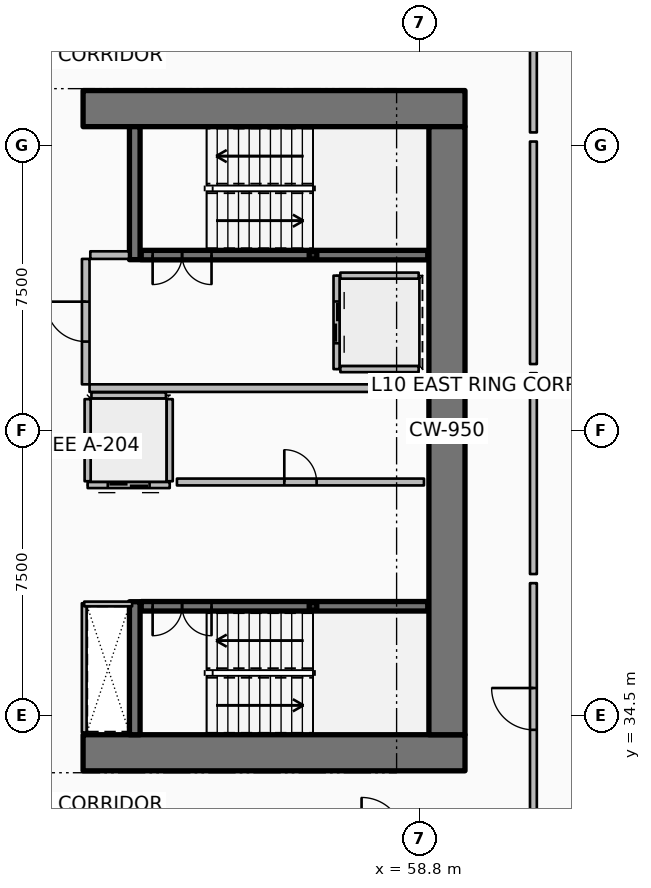
"""IFC4 building model, lengths in metres.
Left out: names, types, materials, properties, quantities, classifications, styles, units other than length and angle.
Written with IfcOpenShell. Run it as: python <this file> out.ifc"""

import sys

from ifc_helpers import new_model, si_unit, direction, frame, frame_2d, origin, origin_2d, place, context, subcontext, project, spatial, rectangle, hollow_rectangle, extrude, element, fill, save


model = new_model("IFC4")
c1 = context("Model", 3, precision=1e-05, world=origin(), true_north=direction((0.0, 1.0)))
c2 = subcontext(c1, "Body", "Model", "MODEL_VIEW")
j1 = project(units=[si_unit("LENGTHUNIT", "METRE"), si_unit("PLANEANGLEUNIT", "RADIAN")], contexts=[c1])
p1 = place(None, origin())
s1 = spatial("IfcSite", under=j1, at=p1, CompositionType="ELEMENT")
p2 = place(p1, origin())
s2 = spatial("IfcBuilding", under=s1, at=p2, CompositionType="ELEMENT")
p3 = place(p2, frame((0.0, 0.0, 45.15)))
s3 = spatial("IfcBuildingStorey", under=s2, at=p3, CompositionType="ELEMENT", Elevation=45.15)
for number, where, z_axis, x_axis in (
    (1, (49.95, 33.525, 0.0), (0.0, 0.0, 1.0), (1.0, 0.0, 0.0)),
    (2, (49.95, 50.475, 0.0), (0.0, 0.0, 1.0), (1.0, 0.0, 0.0)),
):
    element("IfcWall", number, at=place(p3, frame(where, z_axis=z_axis, x_axis=x_axis)), inside=s3, PredefinedType="SHEAR", context=c2, shape_type="SweptSolid", body=[
        extrude(rectangle(XDim=10.05, YDim=0.95, at=frame_2d((5.025, 0.0))), origin(), (0.0, 0.0, 1.0), 3.75),
    ])
p4 = place(p3, frame((59.525, 34.0, 0.0), z_axis=(0.0, 0.0, 1.0), x_axis=(0.0, 1.0, 0.0)))
e3 = element("IfcWall", 3, at=p4, inside=s3, PredefinedType="SHEAR", context=c2, shape_type="SweptSolid", body=[
    extrude(rectangle(XDim=16.0, YDim=0.95, at=frame_2d((8.0, 0.0))), origin(), (0.0, 0.0, 1.0), 3.75),
])
for number, where, z_axis, x_axis in (
    (4, (51.31, 46.5, 0.0), (0.0, 0.0, 1.0), (0.0, 1.0, 0.0)),
    (5, (51.31, 34.0, 0.0), (0.0, 0.0, 1.0), (0.0, 1.0, 0.0)),
):
    element("IfcWall", number, at=place(p3, frame(where, z_axis=z_axis, x_axis=x_axis)), inside=s3, PredefinedType="SHEAR", context=c2, shape_type="SweptSolid", body=[
        extrude(rectangle(XDim=3.5, YDim=0.28, at=frame_2d((1.75, 0.0))), origin(), (0.0, 0.0, 1.0), 3.75),
    ])
for number, where, z_axis, x_axis in (
    (6, (56.0, 46.62, 0.0), (0.0, 0.0, 1.0), (1.0, 0.0, 0.0)),
    (7, (56.0, 37.38, 0.0), (0.0, 0.0, 1.0), (1.0, 0.0, 0.0)),
):
    element("IfcColumn", number, at=place(p3, frame(where, z_axis=z_axis, x_axis=x_axis)), inside=s3, PredefinedType="COLUMN", context=c2, shape_type="SweptSolid", body=[
        extrude(hollow_rectangle(XDim=0.2, YDim=0.2, WallThickness=0.01, InnerFilletRadius=0.01, OuterFilletRadius=0.02, at=origin_2d()), origin(), (0.0, 0.0, 1.0), 1.67),
    ])
p5 = place(p3, frame((51.48, 46.62, 0.0), z_axis=(0.0, 0.0, 1.0), x_axis=(1.0, 0.0, 0.0)))
e8 = element("IfcWall", 8, at=p5, inside=s3, PredefinedType="SOLIDWALL", context=c2, shape_type="SweptSolid", body=[
    extrude(rectangle(XDim=7.54, YDim=0.25, at=frame_2d((3.77, 0.0))), origin(), (0.0, 0.0, 1.0), 3.5),
])
p6 = place(p5, frame((0.3, 0.0, 0.0)))
e9 = element("IfcOpeningElement", 9, at=p6, cuts=e8, PredefinedType="OPENING", context=c2, shape_type="SweptSolid", body=[
    extrude(rectangle(XDim=1.55, YDim=2.15, at=frame_2d((0.775, 1.075))), frame((0.0, 0.135, 0.0), z_axis=(0.0, -1.0, 0.0), x_axis=(1.0, 0.0, 0.0)), (0.0, 0.0, 1.0), 0.27),
])
p7 = place(p3, frame((51.48, 37.38, 0.0), z_axis=(0.0, 0.0, 1.0), x_axis=(1.0, 0.0, 0.0)))
e10 = element("IfcWall", 10, at=p7, inside=s3, PredefinedType="SOLIDWALL", context=c2, shape_type="SweptSolid", body=[
    extrude(rectangle(XDim=7.54, YDim=0.25, at=frame_2d((3.77, 0.0))), origin(), (0.0, 0.0, 1.0), 3.5),
])
p8 = place(p7, frame((0.3, 0.0, 0.0)))
e11 = element("IfcOpeningElement", 11, at=p8, cuts=e10, PredefinedType="OPENING", context=c2, shape_type="SweptSolid", body=[
    extrude(rectangle(XDim=1.55, YDim=2.15, at=frame_2d((0.775, 1.075))), frame((0.0, 0.135, 0.0), z_axis=(0.0, -1.0, 0.0), x_axis=(1.0, 0.0, 0.0)), (0.0, 0.0, 1.0), 0.27),
])
p9 = place(p3, frame((56.62, 46.08, 0.0), z_axis=(0.0, 0.0, 1.0), x_axis=(0.0, -1.0, 0.0)))
e12 = element("IfcWall", 12, at=p9, inside=s3, PredefinedType="PARTITIONING", context=c2, shape_type="SweptSolid", body=[
    extrude(rectangle(XDim=2.46, YDim=0.16, at=frame_2d((1.23, 0.0))), origin(), (0.0, 0.0, 1.0), 3.5),
])
p10 = place(p9, frame((0.68, 0.0, 0.0)))
e13 = element("IfcOpeningElement", 13, at=p10, cuts=e12, PredefinedType="OPENING", context=c2, shape_type="SweptSolid", body=[
    extrude(rectangle(XDim=1.1, YDim=2.1, at=frame_2d((0.55, 1.05))), frame((0.0, 0.09, 0.0), z_axis=(0.0, -1.0, 0.0), x_axis=(1.0, 0.0, 0.0)), (0.0, 0.0, 1.0), 0.18),
])
for number, where, z_axis, x_axis in (
    (14, (56.72, 46.08, 0.0), (0.0, 0.0, 1.0), (1.0, 0.0, 0.0)),
    (15, (56.72, 43.62, 0.0), (0.0, 0.0, 1.0), (1.0, 0.0, 0.0)),
):
    element("IfcWall", number, at=place(p3, frame(where, z_axis=z_axis, x_axis=x_axis)), inside=s3, PredefinedType="PARTITIONING", context=c2, shape_type="SweptSolid", body=[
        extrude(rectangle(XDim=2.06, YDim=0.16, at=frame_2d((1.03, 0.0))), origin(), (0.0, 0.0, 1.0), 3.5),
    ])
p11 = place(p3, frame((52.23, 40.57, 0.0), z_axis=(0.0, 0.0, 1.0), x_axis=(-1.0, 0.0, 0.0)))
e16 = element("IfcWall", 16, at=p11, inside=s3, PredefinedType="PARTITIONING", context=c2, shape_type="SweptSolid", body=[
    extrude(rectangle(XDim=2.16, YDim=0.16, at=frame_2d((1.08, 0.0))), origin(), (0.0, 0.0, 1.0), 3.5),
])
p12 = place(p11, frame((0.53, 0.0, 0.0)))
e17 = element("IfcOpeningElement", 17, at=p12, cuts=e16, PredefinedType="OPENING", context=c2, shape_type="SweptSolid", body=[
    extrude(rectangle(XDim=1.1, YDim=2.1, at=frame_2d((0.55, 1.05))), frame((0.0, 0.09, 0.0), z_axis=(0.0, -1.0, 0.0), x_axis=(1.0, 0.0, 0.0)), (0.0, 0.0, 1.0), 0.18),
])
for number, where, z_axis, x_axis in (
    (18, (52.23, 40.67, 0.0), (0.0, 0.0, 1.0), (0.0, 1.0, 0.0)),
    (19, (50.07, 40.67, 0.0), (0.0, 0.0, 1.0), (0.0, 1.0, 0.0)),
):
    element("IfcWall", number, at=place(p3, frame(where, z_axis=z_axis, x_axis=x_axis)), inside=s3, PredefinedType="PARTITIONING", context=c2, shape_type="SweptSolid", body=[
        extrude(rectangle(XDim=2.16, YDim=0.16, at=frame_2d((1.08, 0.0))), origin(), (0.0, 0.0, 1.0), 3.5),
    ])
p13 = place(p3, frame((50.17, 42.93, 0.0), z_axis=(0.0, 0.0, 1.0), x_axis=(1.0, 0.0, 0.0)))
e20 = element("IfcWall", 20, at=p13, inside=s3, PredefinedType="PARTITIONING", context=c2, shape_type="SweptSolid", body=[
    extrude(rectangle(XDim=1.96, YDim=0.16, at=frame_2d((0.98, 0.0))), origin(), (0.0, 0.0, 1.0), 3.5),
])
p14 = place(p3, frame((52.42, 40.65, 0.0), z_axis=(0.0, 0.0, 1.0), x_axis=(1.0, 0.0, 0.0)))
e21 = element("IfcWall", 21, at=p14, inside=s3, PredefinedType="PARTITIONING", context=c2, shape_type="SweptSolid", body=[
    extrude(rectangle(XDim=6.5, YDim=0.18, at=frame_2d((3.25, 0.0))), origin(), (0.0, 0.0, 1.0), 3.5),
])
p15 = place(p14, frame((2.825, 0.0, 0.0)))
e22 = element("IfcOpeningElement", 22, at=p15, cuts=e21, PredefinedType="OPENING", context=c2, shape_type="SweptSolid", body=[
    extrude(rectangle(XDim=0.85, YDim=2.06, at=frame_2d((0.425, 1.03))), frame((0.0, 0.1, 0.0), z_axis=(0.0, -1.0, 0.0), x_axis=(1.0, 0.0, 0.0)), (0.0, 0.0, 1.0), 0.2),
])
p16 = place(p3, frame((50.12, 43.12, 0.0), z_axis=(0.0, 0.0, 1.0), x_axis=(1.0, 0.0, 0.0)))
e23 = element("IfcWall", 23, at=p16, inside=s3, PredefinedType="PARTITIONING", context=c2, shape_type="SweptSolid", body=[
    extrude(rectangle(XDim=8.88, YDim=0.2, at=frame_2d((4.44, 0.0))), origin(), (0.0, 0.0, 1.0), 3.5),
])
p17 = place(p3, frame((50.14, 46.62, 0.0), z_axis=(0.0, 0.0, 1.0), x_axis=(1.0, 0.0, 0.0)))
e24 = element("IfcWall", 24, at=p17, inside=s3, PredefinedType="PARTITIONING", context=c2, shape_type="SweptSolid", body=[
    extrude(rectangle(XDim=1.02, YDim=0.2, at=frame_2d((0.51, 0.0))), origin(), (0.0, 0.0, 1.0), 3.5),
])
p18 = place(p3, frame((50.02, 43.22, 0.0), z_axis=(0.0, 0.0, 1.0), x_axis=(0.0, 1.0, 0.0)))
e25 = element("IfcWall", 25, at=p18, inside=s3, PredefinedType="PARTITIONING", context=c2, shape_type="SweptSolid", body=[
    extrude(rectangle(XDim=3.3, YDim=0.2, at=frame_2d((1.65, 0.0))), origin(), (0.0, 0.0, 1.0), 3.5),
])
p19 = place(p18, frame((1.125, 0.0, 0.0)))
e26 = element("IfcOpeningElement", 26, at=p19, cuts=e25, PredefinedType="OPENING", context=c2, shape_type="SweptSolid", body=[
    extrude(rectangle(XDim=1.05, YDim=2.1, at=frame_2d((0.525, 1.05))), frame((0.0, 0.11, 0.0), z_axis=(0.0, -1.0, 0.0), x_axis=(1.0, 0.0, 0.0)), (0.0, 0.0, 1.0), 0.22),
])
p20 = place(p3, frame((49.98, 34.06, 0.0), z_axis=(0.0, 0.0, 1.0), x_axis=(0.0, 1.0, 0.0)))
e27 = element("IfcWall", 27, at=p20, inside=s3, PredefinedType="PARTITIONING", context=c2, shape_type="SweptSolid", body=[
    extrude(rectangle(XDim=3.4, YDim=0.125, at=frame_2d((1.7, 0.0))), origin(), (0.0, 0.0, 1.0), 2.94),
])
p21 = place(p3, frame((49.98, 37.44, 0.0), z_axis=(0.0, 0.0, 1.0), x_axis=(1.0, 0.0, 0.0)))
e28 = element("IfcWall", 28, at=p21, inside=s3, PredefinedType="PARTITIONING", context=c2, shape_type="SweptSolid", body=[
    extrude(rectangle(XDim=1.26, YDim=0.125, at=frame_2d((0.63, 0.0))), origin(), (0.0, 0.0, 1.0), 2.94),
])
p22 = place(p3, frame((61.8, 31.37, 0.0), z_axis=(0.0, 0.0, 1.0), x_axis=(0.0, 1.0, 0.0)))
e29 = element("IfcWall", 29, at=p22, inside=s3, PredefinedType="PARTITIONING", context=c2, shape_type="SweptSolid", body=[
    extrude(rectangle(XDim=6.618, YDim=0.18, at=frame_2d((3.309, 0.0))), origin(), (0.0, 0.0, 1.0), 2.867),
])
p23 = place(p22, frame((2.759, 0.0, 0.0)))
e30 = element("IfcOpeningElement", 30, at=p23, cuts=e29, PredefinedType="OPENING", context=c2, shape_type="SweptSolid", body=[
    extrude(rectangle(XDim=1.1, YDim=2.1, at=frame_2d((0.55, 1.05))), frame((0.0, 0.1, 0.0), z_axis=(0.0, -1.0, 0.0), x_axis=(1.0, 0.0, 0.0)), (0.0, 0.0, 1.0), 0.2),
])
p24 = place(p3, frame((61.8, 38.228, 0.0), z_axis=(0.0, 0.0, 1.0), x_axis=(0.0, 1.0, 0.0)))
e31 = element("IfcWall", 31, at=p24, inside=s3, PredefinedType="PARTITIONING", context=c2, shape_type="SweptSolid", body=[
    extrude(rectangle(XDim=5.285, YDim=0.18, at=frame_2d((2.643, 0.0))), origin(), (0.0, 0.0, 1.0), 2.867),
])
p25 = place(p3, frame((61.8, 43.753, 0.0), z_axis=(0.0, 0.0, 1.0), x_axis=(0.0, 1.0, 0.0)))
e32 = element("IfcWall", 32, at=p25, inside=s3, PredefinedType="PARTITIONING", context=c2, shape_type="SweptSolid", body=[
    extrude(rectangle(XDim=5.855, YDim=0.18, at=frame_2d((2.927, 0.0))), origin(), (0.0, 0.0, 1.0), 2.867),
])
p26 = place(p3, frame((61.8, 49.848, 0.0), z_axis=(0.0, 0.0, 1.0), x_axis=(0.0, 1.0, 0.0)))
e33 = element("IfcWall", 33, at=p26, inside=s3, PredefinedType="PARTITIONING", context=c2, shape_type="SweptSolid", body=[
    extrude(rectangle(XDim=2.781, YDim=0.18, at=frame_2d((1.391, 0.0))), origin(), (0.0, 0.0, 1.0), 2.867),
])
p27 = place(p6, origin())
e34 = element("IfcDoor", 34, at=p27, inside=s3, OperationType="DOUBLE_DOOR_SINGLE_SWING", PredefinedType="DOOR", context=c2, shape_type="SweptSolid", body=[
    extrude(rectangle(XDim=1.55, YDim=2.15, at=frame_2d((0.775, 1.075))), frame((0.0, 0.025, 0.0), z_axis=(0.0, -1.0, 0.0), x_axis=(1.0, 0.0, 0.0)), (0.0, 0.0, 1.0), 0.05),
])
fill(e9, e34)
p28 = place(p8, origin())
e35 = element("IfcDoor", 35, at=p28, inside=s3, OperationType="DOUBLE_DOOR_SINGLE_SWING", PredefinedType="DOOR", context=c2, shape_type="SweptSolid", body=[
    extrude(rectangle(XDim=1.55, YDim=2.15, at=frame_2d((0.775, 1.075))), frame((0.0, 0.025, 0.0), z_axis=(0.0, -1.0, 0.0), x_axis=(1.0, 0.0, 0.0)), (0.0, 0.0, 1.0), 0.05),
])
fill(e11, e35)
p29 = place(p10, origin())
e36 = element("IfcDoor", 36, at=p29, inside=s3, OperationType="DOUBLE_DOOR_SLIDING", PredefinedType="DOOR", context=c2, shape_type="SweptSolid", body=[
    extrude(rectangle(XDim=1.1, YDim=2.1, at=frame_2d((0.55, 1.05))), frame((0.0, 0.025, 0.0), z_axis=(0.0, -1.0, 0.0), x_axis=(1.0, 0.0, 0.0)), (0.0, 0.0, 1.0), 0.05),
])
fill(e13, e36)
p30 = place(p12, origin())
e37 = element("IfcDoor", 37, at=p30, inside=s3, OperationType="DOUBLE_DOOR_SLIDING", PredefinedType="DOOR", context=c2, shape_type="SweptSolid", body=[
    extrude(rectangle(XDim=1.1, YDim=2.1, at=frame_2d((0.55, 1.05))), frame((0.0, 0.025, 0.0), z_axis=(0.0, -1.0, 0.0), x_axis=(1.0, 0.0, 0.0)), (0.0, 0.0, 1.0), 0.05),
])
fill(e17, e37)
p31 = place(p15, origin())
e38 = element("IfcDoor", 38, at=p31, inside=s3, OperationType="SINGLE_SWING_LEFT", PredefinedType="DOOR", context=c2, shape_type="SweptSolid", body=[
    extrude(rectangle(XDim=0.85, YDim=2.06, at=frame_2d((0.425, 1.03))), frame((0.0, 0.025, 0.0), z_axis=(0.0, -1.0, 0.0), x_axis=(1.0, 0.0, 0.0)), (0.0, 0.0, 1.0), 0.05),
])
fill(e22, e38)
p32 = place(p19, origin())
e39 = element("IfcDoor", 39, at=p32, inside=s3, OperationType="SINGLE_SWING_RIGHT", PredefinedType="DOOR", context=c2, shape_type="SweptSolid", body=[
    extrude(rectangle(XDim=1.05, YDim=2.1, at=frame_2d((0.525, 1.05))), frame((0.0, 0.025, 0.0), z_axis=(0.0, -1.0, 0.0), x_axis=(1.0, 0.0, 0.0)), (0.0, 0.0, 1.0), 0.05),
])
fill(e26, e39)
p33 = place(p23, origin())
e40 = element("IfcDoor", 40, at=p33, inside=s3, OperationType="SINGLE_SWING_RIGHT", PredefinedType="DOOR", context=c2, shape_type="SweptSolid", body=[
    extrude(rectangle(XDim=1.1, YDim=2.1, at=frame_2d((0.55, 1.05))), frame((0.0, 0.025, 0.0), z_axis=(0.0, -1.0, 0.0), x_axis=(1.0, 0.0, 0.0)), (0.0, 0.0, 1.0), 0.05),
])
fill(e30, e40)
save(model, sys.argv[1])
